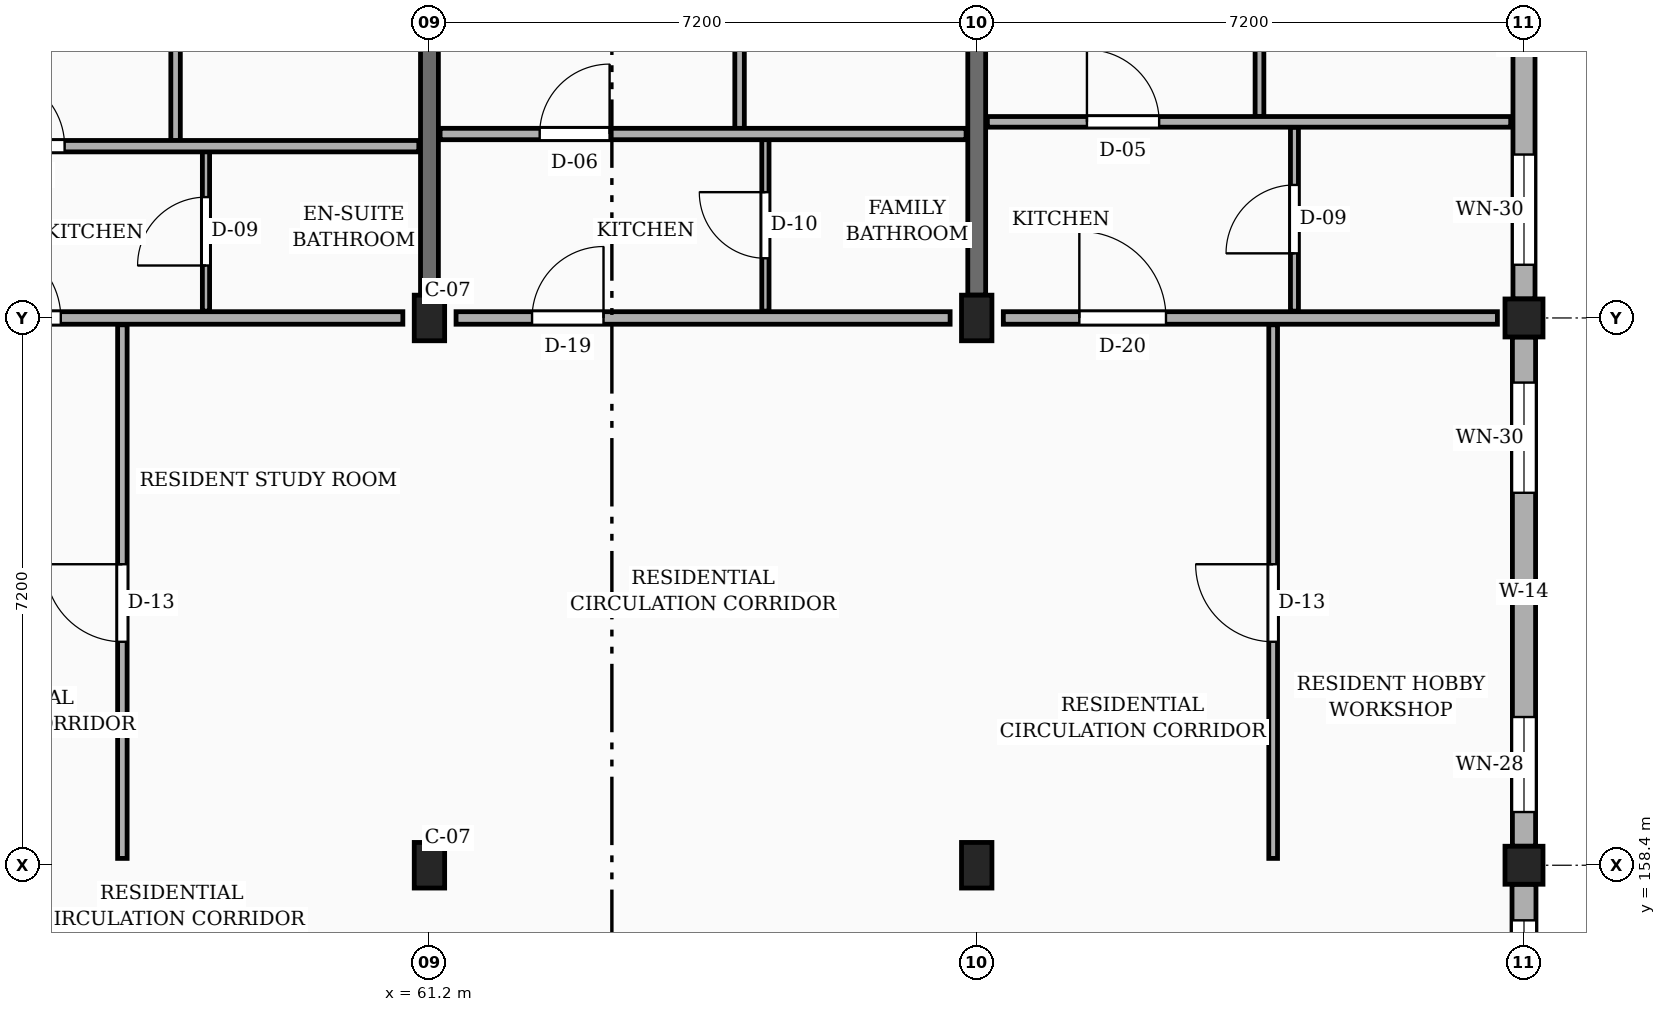
"""IFC4 building model, lengths in metres.
Left out: names, types, materials, properties, quantities, classifications, styles, units other than length and angle.
Written with IfcOpenShell. Run it as: python <this file> out.ifc"""

import sys

from ifc_helpers import new_model, si_unit, direction, frame, frame_2d, origin, origin_2d, place, context, subcontext, project, spatial, rectangle, extrude, element, fill, save


model = new_model("IFC4")
c1 = context("Model", 3, precision=1e-05, world=origin(), true_north=direction((0.0, 1.0)))
c2 = subcontext(c1, "Body", "Model", "MODEL_VIEW")
j1 = project(units=[si_unit("LENGTHUNIT", "METRE"), si_unit("PLANEANGLEUNIT", "RADIAN")], contexts=[c1])
p1 = place(None, origin())
s1 = spatial("IfcSite", under=j1, at=p1, CompositionType="ELEMENT")
p2 = place(p1, origin())
s2 = spatial("IfcBuilding", under=s1, at=p2, CompositionType="ELEMENT")
p3 = place(p2, frame((0.0, 0.0, 23.4)))
s3 = spatial("IfcBuildingStorey", under=s2, at=p3, CompositionType="ELEMENT", Elevation=23.4)
for number, where, z_axis, x_axis in (
    (1, (61.2, 158.4, 0.0), (0.0, 0.0, 1.0), (1.0, 0.0, 0.0)),
    (2, (61.2, 165.6, 0.0), (0.0, 0.0, 1.0), (1.0, 0.0, 0.0)),
    (3, (68.4, 158.4, 0.0), (0.0, 0.0, 1.0), (1.0, 0.0, 0.0)),
    (4, (68.4, 165.6, 0.0), (0.0, 0.0, 1.0), (1.0, 0.0, 0.0)),
):
    element("IfcColumn", number, at=place(p3, frame(where, z_axis=z_axis, x_axis=x_axis)), inside=s3, PredefinedType="COLUMN", context=c2, shape_type="SweptSolid", body=[
        extrude(rectangle(XDim=0.4, YDim=0.6, at=origin_2d()), origin(), (0.0, 0.0, 1.0), 3.15),
    ])
for number, where, z_axis, x_axis in (
    (5, (75.6, 158.4, 0.0), (0.0, 0.0, 1.0), (1.0, 0.0, 0.0)),
    (6, (75.6, 165.6, 0.0), (0.0, 0.0, 1.0), (1.0, 0.0, 0.0)),
):
    element("IfcColumn", number, at=place(p3, frame(where, z_axis=z_axis, x_axis=x_axis)), inside=s3, PredefinedType="COLUMN", context=c2, shape_type="SweptSolid", body=[
        extrude(rectangle(XDim=0.5, YDim=0.5, at=origin_2d()), origin(), (0.0, 0.0, 1.0), 3.15),
    ])
for number, where, z_axis, x_axis in (
    (7, (61.2, 165.9, 0.0), (0.0, 0.0, 1.0), (0.0, 1.0, 0.0)),
    (8, (68.4, 165.9, 0.0), (0.0, 0.0, 1.0), (0.0, 1.0, 0.0)),
):
    element("IfcWall", number, at=place(p3, frame(where, z_axis=z_axis, x_axis=x_axis)), inside=s3, PredefinedType="SOLIDWALL", context=c2, shape_type="SweptSolid", body=[
        extrude(rectangle(XDim=6.65, YDim=0.235, at=frame_2d((3.325, 0.0))), origin(), (0.0, 0.0, 1.0), 2.185),
    ])
p4 = place(p3, frame((75.6, 151.45, 0.0), z_axis=(0.0, 0.0, 1.0), x_axis=(0.0, 1.0, 0.0)))
e9 = element("IfcWall", 9, at=p4, inside=s3, PredefinedType="SOLIDWALL", context=c2, shape_type="SweptSolid", body=[
    extrude(rectangle(XDim=6.7, YDim=0.315, at=frame_2d((3.35, 0.0))), origin(), (0.0, 0.0, 1.0), 2.455),
])
p5 = place(p4, frame((2.12, 0.0, 0.78)))
e10 = element("IfcOpeningElement", 10, at=p5, cuts=e9, PredefinedType="OPENING", context=c2, shape_type="SweptSolid", body=[
    extrude(rectangle(XDim=1.05, YDim=1.44, at=frame_2d((0.525, 0.72))), frame((0.0, 0.167, 0.0), z_axis=(0.0, -1.0, 0.0), x_axis=(1.0, 0.0, 0.0)), (0.0, 0.0, 1.0), 0.335),
])
p6 = place(p4, frame((5.185, 0.0, 0.78)))
e11 = element("IfcOpeningElement", 11, at=p6, cuts=e9, PredefinedType="OPENING", context=c2, shape_type="SweptSolid", body=[
    extrude(rectangle(XDim=1.04, YDim=1.26, at=frame_2d((0.52, 0.63))), frame((0.0, 0.167, 0.0), z_axis=(0.0, -1.0, 0.0), x_axis=(1.0, 0.0, 0.0)), (0.0, 0.0, 1.0), 0.335),
])
p7 = place(p3, frame((75.6, 158.65, 0.0), z_axis=(0.0, 0.0, 1.0), x_axis=(0.0, 1.0, 0.0)))
e12 = element("IfcWall", 12, at=p7, inside=s3, PredefinedType="SOLIDWALL", context=c2, shape_type="SweptSolid", body=[
    extrude(rectangle(XDim=6.7, YDim=0.305, at=frame_2d((3.35, 0.0))), origin(), (0.0, 0.0, 1.0), 2.455),
])
p8 = place(p7, frame((0.45, 0.0, 0.78)))
e13 = element("IfcOpeningElement", 13, at=p8, cuts=e12, PredefinedType="OPENING", context=c2, shape_type="SweptSolid", body=[
    extrude(rectangle(XDim=1.25, YDim=1.44, at=frame_2d((0.625, 0.72))), frame((0.0, 0.163, 0.0), z_axis=(0.0, -1.0, 0.0), x_axis=(1.0, 0.0, 0.0)), (0.0, 0.0, 1.0), 0.325),
])
p9 = place(p7, frame((4.65, 0.0, 0.78)))
e14 = element("IfcOpeningElement", 14, at=p9, cuts=e12, PredefinedType="OPENING", context=c2, shape_type="SweptSolid", body=[
    extrude(rectangle(XDim=1.45, YDim=1.44, at=frame_2d((0.725, 0.72))), frame((0.0, 0.163, 0.0), z_axis=(0.0, -1.0, 0.0), x_axis=(1.0, 0.0, 0.0)), (0.0, 0.0, 1.0), 0.325),
])
p10 = place(p3, frame((75.6, 165.85, 0.0), z_axis=(0.0, 0.0, 1.0), x_axis=(0.0, 1.0, 0.0)))
e15 = element("IfcWall", 15, at=p10, inside=s3, PredefinedType="SOLIDWALL", context=c2, shape_type="SweptSolid", body=[
    extrude(rectangle(XDim=6.7, YDim=0.29, at=frame_2d((3.35, 0.0))), origin(), (0.0, 0.0, 1.0), 2.455),
])
p11 = place(p10, frame((0.45, 0.0, 0.78)))
e16 = element("IfcOpeningElement", 16, at=p11, cuts=e15, PredefinedType="OPENING", context=c2, shape_type="SweptSolid", body=[
    extrude(rectangle(XDim=1.45, YDim=1.44, at=frame_2d((0.725, 0.72))), frame((0.0, 0.155, 0.0), z_axis=(0.0, -1.0, 0.0), x_axis=(1.0, 0.0, 0.0)), (0.0, 0.0, 1.0), 0.31),
])
p12 = place(p10, frame((4.65, 0.0, 0.78)))
e17 = element("IfcOpeningElement", 17, at=p12, cuts=e15, PredefinedType="OPENING", context=c2, shape_type="SweptSolid", body=[
    extrude(rectangle(XDim=0.92, YDim=1.15, at=frame_2d((0.46, 0.575))), frame((0.0, 0.155, 0.0), z_axis=(0.0, -1.0, 0.0), x_axis=(1.0, 0.0, 0.0)), (0.0, 0.0, 1.0), 0.31),
])
p13 = place(p3, frame((54.35, 165.6, 0.0), z_axis=(0.0, 0.0, 1.0), x_axis=(1.0, 0.0, 0.0)))
e18 = element("IfcWall", 18, at=p13, inside=s3, PredefinedType="PARTITIONING", context=c2, shape_type="SweptSolid", body=[
    extrude(rectangle(XDim=6.5, YDim=0.165, at=frame_2d((3.25, 0.0))), origin(), (0.0, 0.0, 1.0), 2.32),
])
p14 = place(p13, frame((1.0, 0.0, 0.0)))
e19 = element("IfcOpeningElement", 19, at=p14, cuts=e18, PredefinedType="OPENING", context=c2, shape_type="SweptSolid", body=[
    extrude(rectangle(XDim=1.0, YDim=2.15, at=frame_2d((0.5, 1.075))), frame((0.0, 0.093, 0.0), z_axis=(0.0, -1.0, 0.0), x_axis=(1.0, 0.0, 0.0)), (0.0, 0.0, 1.0), 0.185),
])
p15 = place(p3, frame((61.55, 165.6, 0.0), z_axis=(0.0, 0.0, 1.0), x_axis=(1.0, 0.0, 0.0)))
e20 = element("IfcWall", 20, at=p15, inside=s3, PredefinedType="PARTITIONING", context=c2, shape_type="SweptSolid", body=[
    extrude(rectangle(XDim=6.5, YDim=0.165, at=frame_2d((3.25, 0.0))), origin(), (0.0, 0.0, 1.0), 2.32),
])
p16 = place(p15, frame((1.0, 0.0, 0.0)))
e21 = element("IfcOpeningElement", 21, at=p16, cuts=e20, PredefinedType="OPENING", context=c2, shape_type="SweptSolid", body=[
    extrude(rectangle(XDim=0.94, YDim=2.12, at=frame_2d((0.47, 1.06))), frame((0.0, 0.093, 0.0), z_axis=(0.0, -1.0, 0.0), x_axis=(1.0, 0.0, 0.0)), (0.0, 0.0, 1.0), 0.185),
])
p17 = place(p3, frame((68.75, 165.6, 0.0), z_axis=(0.0, 0.0, 1.0), x_axis=(1.0, 0.0, 0.0)))
e22 = element("IfcWall", 22, at=p17, inside=s3, PredefinedType="PARTITIONING", context=c2, shape_type="SweptSolid", body=[
    extrude(rectangle(XDim=6.5, YDim=0.165, at=frame_2d((3.25, 0.0))), origin(), (0.0, 0.0, 1.0), 2.32),
])
p18 = place(p17, frame((1.0, 0.0, 0.0)))
e23 = element("IfcOpeningElement", 23, at=p18, cuts=e22, PredefinedType="OPENING", context=c2, shape_type="SweptSolid", body=[
    extrude(rectangle(XDim=1.14, YDim=2.18, at=frame_2d((0.57, 1.09))), frame((0.0, 0.093, 0.0), z_axis=(0.0, -1.0, 0.0), x_axis=(1.0, 0.0, 0.0)), (0.0, 0.0, 1.0), 0.185),
])
p19 = place(p3, frame((57.16, 158.49, 0.0), z_axis=(0.0, 0.0, 1.0), x_axis=(0.0, 1.0, 0.0)))
e24 = element("IfcWall", 24, at=p19, inside=s3, PredefinedType="PARTITIONING", context=c2, shape_type="SweptSolid", body=[
    extrude(rectangle(XDim=7.02, YDim=0.125, at=frame_2d((3.51, 0.0))), origin(), (0.0, 0.0, 1.0), 2.32),
])
p20 = place(p19, frame((2.85, 0.0, 0.0)))
e25 = element("IfcOpeningElement", 25, at=p20, cuts=e24, PredefinedType="OPENING", context=c2, shape_type="SweptSolid", body=[
    extrude(rectangle(XDim=1.02, YDim=2.15, at=frame_2d((0.51, 1.075))), frame((0.0, 0.073, 0.0), z_axis=(0.0, -1.0, 0.0), x_axis=(1.0, 0.0, 0.0)), (0.0, 0.0, 1.0), 0.145),
])
p21 = place(p3, frame((57.86, 167.93, 0.0), z_axis=(0.0, 0.0, 1.0), x_axis=(0.0, 1.0, 0.0)))
e26 = element("IfcWall", 26, at=p21, inside=s3, PredefinedType="PARTITIONING", context=c2, shape_type="SweptSolid", body=[
    extrude(rectangle(XDim=4.695, YDim=0.125, at=frame_2d((2.348, 0.0))), origin(), (0.0, 0.0, 1.0), 2.32),
])
p22 = place(p21, frame((1.897, 0.0, 0.0)))
e27 = element("IfcOpeningElement", 27, at=p22, cuts=e26, PredefinedType="OPENING", context=c2, shape_type="SweptSolid", body=[
    extrude(rectangle(XDim=0.9, YDim=2.1, at=frame_2d((0.45, 1.05))), frame((0.0, 0.073, 0.0), z_axis=(0.0, -1.0, 0.0), x_axis=(1.0, 0.0, 0.0)), (0.0, 0.0, 1.0), 0.145),
])
p23 = place(p3, frame((58.26, 165.69, 0.0), z_axis=(0.0, 0.0, 1.0), x_axis=(0.0, 1.0, 0.0)))
e28 = element("IfcWall", 28, at=p23, inside=s3, PredefinedType="PARTITIONING", context=c2, shape_type="SweptSolid", body=[
    extrude(rectangle(XDim=2.1, YDim=0.095, at=frame_2d((1.05, 0.0))), origin(), (0.0, 0.0, 1.0), 2.32),
])
p24 = place(p23, frame((0.6, 0.0, 0.0)))
e29 = element("IfcOpeningElement", 29, at=p24, cuts=e28, PredefinedType="OPENING", context=c2, shape_type="SweptSolid", body=[
    extrude(rectangle(XDim=0.9, YDim=2.05, at=frame_2d((0.45, 1.025))), frame((0.0, 0.058, 0.0), z_axis=(0.0, -1.0, 0.0), x_axis=(1.0, 0.0, 0.0)), (0.0, 0.0, 1.0), 0.115),
])
p25 = place(p3, frame((54.14, 167.86, 0.0), z_axis=(0.0, 0.0, 1.0), x_axis=(1.0, 0.0, 0.0)))
e30 = element("IfcWall", 30, at=p25, inside=s3, PredefinedType="PARTITIONING", context=c2, shape_type="SweptSolid", body=[
    extrude(rectangle(XDim=6.92, YDim=0.15, at=frame_2d((3.46, 0.0))), origin(), (0.0, 0.0, 1.0), 2.32),
])
p26 = place(p25, frame((1.31, 0.0, 0.0)))
e31 = element("IfcOpeningElement", 31, at=p26, cuts=e30, PredefinedType="OPENING", context=c2, shape_type="SweptSolid", body=[
    extrude(rectangle(XDim=0.95, YDim=2.1, at=frame_2d((0.475, 1.05))), frame((0.0, 0.085, 0.0), z_axis=(0.0, -1.0, 0.0), x_axis=(1.0, 0.0, 0.0)), (0.0, 0.0, 1.0), 0.17),
])
p27 = place(p3, frame((65.28, 168.09, 0.0), z_axis=(0.0, 0.0, 1.0), x_axis=(0.0, 1.0, 0.0)))
e32 = element("IfcWall", 32, at=p27, inside=s3, PredefinedType="PARTITIONING", context=c2, shape_type="SweptSolid", body=[
    extrude(rectangle(XDim=4.535, YDim=0.125, at=frame_2d((2.268, 0.0))), origin(), (0.0, 0.0, 1.0), 2.32),
])
p28 = place(p27, frame((1.827, 0.0, 0.0)))
e33 = element("IfcOpeningElement", 33, at=p28, cuts=e32, PredefinedType="OPENING", context=c2, shape_type="SweptSolid", body=[
    extrude(rectangle(XDim=0.88, YDim=2.08, at=frame_2d((0.44, 1.04))), frame((0.0, 0.073, 0.0), z_axis=(0.0, -1.0, 0.0), x_axis=(1.0, 0.0, 0.0)), (0.0, 0.0, 1.0), 0.145),
])
p29 = place(p3, frame((65.62, 165.69, 0.0), z_axis=(0.0, 0.0, 1.0), x_axis=(0.0, 1.0, 0.0)))
e34 = element("IfcWall", 34, at=p29, inside=s3, PredefinedType="PARTITIONING", context=c2, shape_type="SweptSolid", body=[
    extrude(rectangle(XDim=2.26, YDim=0.095, at=frame_2d((1.13, 0.0))), origin(), (0.0, 0.0, 1.0), 2.32),
])
p30 = place(p29, frame((0.695, 0.0, 0.0)))
e35 = element("IfcOpeningElement", 35, at=p30, cuts=e34, PredefinedType="OPENING", context=c2, shape_type="SweptSolid", body=[
    extrude(rectangle(XDim=0.87, YDim=2.05, at=frame_2d((0.435, 1.025))), frame((0.0, 0.058, 0.0), z_axis=(0.0, -1.0, 0.0), x_axis=(1.0, 0.0, 0.0)), (0.0, 0.0, 1.0), 0.115),
])
p31 = place(p3, frame((61.34, 168.02, 0.0), z_axis=(0.0, 0.0, 1.0), x_axis=(1.0, 0.0, 0.0)))
e36 = element("IfcWall", 36, at=p31, inside=s3, PredefinedType="PARTITIONING", context=c2, shape_type="SweptSolid", body=[
    extrude(rectangle(XDim=6.92, YDim=0.15, at=frame_2d((3.46, 0.0))), origin(), (0.0, 0.0, 1.0), 2.32),
])
p32 = place(p31, frame((1.31, 0.0, 0.0)))
e37 = element("IfcOpeningElement", 37, at=p32, cuts=e36, PredefinedType="OPENING", context=c2, shape_type="SweptSolid", body=[
    extrude(rectangle(XDim=0.92, YDim=2.1, at=frame_2d((0.46, 1.05))), frame((0.0, 0.085, 0.0), z_axis=(0.0, -1.0, 0.0), x_axis=(1.0, 0.0, 0.0)), (0.0, 0.0, 1.0), 0.17),
])
p33 = place(p3, frame((72.3, 158.49, 0.0), z_axis=(0.0, 0.0, 1.0), x_axis=(0.0, 1.0, 0.0)))
e38 = element("IfcWall", 38, at=p33, inside=s3, PredefinedType="PARTITIONING", context=c2, shape_type="SweptSolid", body=[
    extrude(rectangle(XDim=7.02, YDim=0.115, at=frame_2d((3.51, 0.0))), origin(), (0.0, 0.0, 1.0), 2.32),
])
p34 = place(p33, frame((2.85, 0.0, 0.0)))
e39 = element("IfcOpeningElement", 39, at=p34, cuts=e38, PredefinedType="OPENING", context=c2, shape_type="SweptSolid", body=[
    extrude(rectangle(XDim=1.02, YDim=2.15, at=frame_2d((0.51, 1.075))), frame((0.0, 0.067, 0.0), z_axis=(0.0, -1.0, 0.0), x_axis=(1.0, 0.0, 0.0)), (0.0, 0.0, 1.0), 0.135),
])
p35 = place(p3, frame((72.12, 168.25, 0.0), z_axis=(0.0, 0.0, 1.0), x_axis=(0.0, 1.0, 0.0)))
e40 = element("IfcWall", 40, at=p35, inside=s3, PredefinedType="PARTITIONING", context=c2, shape_type="SweptSolid", body=[
    extrude(rectangle(XDim=4.375, YDim=0.115, at=frame_2d((2.188, 0.0))), origin(), (0.0, 0.0, 1.0), 2.32),
])
p36 = place(p35, frame((1.738, 0.0, 0.0)))
e41 = element("IfcOpeningElement", 41, at=p36, cuts=e40, PredefinedType="OPENING", context=c2, shape_type="SweptSolid", body=[
    extrude(rectangle(XDim=0.9, YDim=2.1, at=frame_2d((0.45, 1.05))), frame((0.0, 0.067, 0.0), z_axis=(0.0, -1.0, 0.0), x_axis=(1.0, 0.0, 0.0)), (0.0, 0.0, 1.0), 0.135),
])
p37 = place(p3, frame((72.58, 165.69, 0.0), z_axis=(0.0, 0.0, 1.0), x_axis=(0.0, 1.0, 0.0)))
e42 = element("IfcWall", 42, at=p37, inside=s3, PredefinedType="PARTITIONING", context=c2, shape_type="SweptSolid", body=[
    extrude(rectangle(XDim=2.42, YDim=0.105, at=frame_2d((1.21, 0.0))), origin(), (0.0, 0.0, 1.0), 2.32),
])
p38 = place(p37, frame((0.76, 0.0, 0.0)))
e43 = element("IfcOpeningElement", 43, at=p38, cuts=e42, PredefinedType="OPENING", context=c2, shape_type="SweptSolid", body=[
    extrude(rectangle(XDim=0.9, YDim=2.05, at=frame_2d((0.45, 1.025))), frame((0.0, 0.062, 0.0), z_axis=(0.0, -1.0, 0.0), x_axis=(1.0, 0.0, 0.0)), (0.0, 0.0, 1.0), 0.125),
])
p39 = place(p3, frame((68.54, 168.18, 0.0), z_axis=(0.0, 0.0, 1.0), x_axis=(1.0, 0.0, 0.0)))
e44 = element("IfcWall", 44, at=p39, inside=s3, PredefinedType="PARTITIONING", context=c2, shape_type="SweptSolid", body=[
    extrude(rectangle(XDim=6.885, YDim=0.14, at=frame_2d((3.442, 0.0))), origin(), (0.0, 0.0, 1.0), 2.32),
])
p40 = place(p39, frame((1.31, 0.0, 0.0)))
e45 = element("IfcOpeningElement", 45, at=p40, cuts=e44, PredefinedType="OPENING", context=c2, shape_type="SweptSolid", body=[
    extrude(rectangle(XDim=0.95, YDim=2.1, at=frame_2d((0.475, 1.05))), frame((0.0, 0.08, 0.0), z_axis=(0.0, -1.0, 0.0), x_axis=(1.0, 0.0, 0.0)), (0.0, 0.0, 1.0), 0.16),
])
p41 = place(p6, origin())
e46 = element("IfcWindow", 46, at=p41, inside=s3, PartitioningType="SINGLE_PANEL", PredefinedType="WINDOW", context=c2, shape_type="SweptSolid", body=[
    extrude(rectangle(XDim=1.04, YDim=1.26, at=frame_2d((0.52, 0.63))), frame((0.0, 0.03, 0.0), z_axis=(0.0, -1.0, 0.0), x_axis=(1.0, 0.0, 0.0)), (0.0, 0.0, 1.0), 0.06),
])
fill(e11, e46)
p42 = place(p8, origin())
e47 = element("IfcWindow", 47, at=p42, inside=s3, PartitioningType="SINGLE_PANEL", PredefinedType="WINDOW", context=c2, shape_type="SweptSolid", body=[
    extrude(rectangle(XDim=1.25, YDim=1.44, at=frame_2d((0.625, 0.72))), frame((0.0, 0.03, 0.0), z_axis=(0.0, -1.0, 0.0), x_axis=(1.0, 0.0, 0.0)), (0.0, 0.0, 1.0), 0.06),
])
fill(e13, e47)
p43 = place(p9, origin())
e48 = element("IfcWindow", 48, at=p43, inside=s3, PartitioningType="SINGLE_PANEL", PredefinedType="WINDOW", context=c2, shape_type="SweptSolid", body=[
    extrude(rectangle(XDim=1.45, YDim=1.44, at=frame_2d((0.725, 0.72))), frame((0.0, 0.03, 0.0), z_axis=(0.0, -1.0, 0.0), x_axis=(1.0, 0.0, 0.0)), (0.0, 0.0, 1.0), 0.06),
])
fill(e14, e48)
p44 = place(p11, origin())
e49 = element("IfcWindow", 49, at=p44, inside=s3, PartitioningType="SINGLE_PANEL", PredefinedType="WINDOW", context=c2, shape_type="SweptSolid", body=[
    extrude(rectangle(XDim=1.45, YDim=1.44, at=frame_2d((0.725, 0.72))), frame((0.0, 0.03, 0.0), z_axis=(0.0, -1.0, 0.0), x_axis=(1.0, 0.0, 0.0)), (0.0, 0.0, 1.0), 0.06),
])
fill(e16, e49)
p45 = place(p14, origin())
e50 = element("IfcDoor", 50, at=p45, inside=s3, OperationType="SINGLE_SWING_LEFT", PredefinedType="DOOR", context=c2, shape_type="SweptSolid", body=[
    extrude(rectangle(XDim=1.0, YDim=2.15, at=frame_2d((0.5, 1.075))), frame((0.0, 0.025, 0.0), z_axis=(0.0, -1.0, 0.0), x_axis=(1.0, 0.0, 0.0)), (0.0, 0.0, 1.0), 0.05),
])
fill(e19, e50)
p46 = place(p16, origin())
e51 = element("IfcDoor", 51, at=p46, inside=s3, OperationType="SINGLE_SWING_RIGHT", PredefinedType="DOOR", context=c2, shape_type="SweptSolid", body=[
    extrude(rectangle(XDim=0.94, YDim=2.12, at=frame_2d((0.47, 1.06))), frame((0.0, 0.025, 0.0), z_axis=(0.0, -1.0, 0.0), x_axis=(1.0, 0.0, 0.0)), (0.0, 0.0, 1.0), 0.05),
])
fill(e21, e51)
p47 = place(p18, origin())
e52 = element("IfcDoor", 52, at=p47, inside=s3, OperationType="SINGLE_SWING_LEFT", PredefinedType="DOOR", context=c2, shape_type="SweptSolid", body=[
    extrude(rectangle(XDim=1.14, YDim=2.18, at=frame_2d((0.57, 1.09))), frame((0.0, 0.025, 0.0), z_axis=(0.0, -1.0, 0.0), x_axis=(1.0, 0.0, 0.0)), (0.0, 0.0, 1.0), 0.05),
])
fill(e23, e52)
p48 = place(p20, origin())
e53 = element("IfcDoor", 53, at=p48, inside=s3, OperationType="SINGLE_SWING_RIGHT", PredefinedType="DOOR", context=c2, shape_type="SweptSolid", body=[
    extrude(rectangle(XDim=1.02, YDim=2.15, at=frame_2d((0.51, 1.075))), frame((0.0, 0.025, 0.0), z_axis=(0.0, -1.0, 0.0), x_axis=(1.0, 0.0, 0.0)), (0.0, 0.0, 1.0), 0.05),
])
fill(e25, e53)
p49 = place(p24, origin())
e54 = element("IfcDoor", 54, at=p49, inside=s3, OperationType="SINGLE_SWING_LEFT", PredefinedType="DOOR", context=c2, shape_type="SweptSolid", body=[
    extrude(rectangle(XDim=0.9, YDim=2.05, at=frame_2d((0.45, 1.025))), frame((0.0, 0.025, 0.0), z_axis=(0.0, -1.0, 0.0), x_axis=(1.0, 0.0, 0.0)), (0.0, 0.0, 1.0), 0.05),
])
fill(e29, e54)
p50 = place(p26, origin())
e55 = element("IfcDoor", 55, at=p50, inside=s3, OperationType="SINGLE_SWING_LEFT", PredefinedType="DOOR", context=c2, shape_type="SweptSolid", body=[
    extrude(rectangle(XDim=0.95, YDim=2.1, at=frame_2d((0.475, 1.05))), frame((0.0, 0.025, 0.0), z_axis=(0.0, -1.0, 0.0), x_axis=(1.0, 0.0, 0.0)), (0.0, 0.0, 1.0), 0.05),
])
fill(e31, e55)
p51 = place(p30, origin())
e56 = element("IfcDoor", 56, at=p51, inside=s3, OperationType="SINGLE_SWING_RIGHT", PredefinedType="DOOR", context=c2, shape_type="SweptSolid", body=[
    extrude(rectangle(XDim=0.87, YDim=2.05, at=frame_2d((0.435, 1.025))), frame((0.0, 0.025, 0.0), z_axis=(0.0, -1.0, 0.0), x_axis=(1.0, 0.0, 0.0)), (0.0, 0.0, 1.0), 0.05),
])
fill(e35, e56)
p52 = place(p32, origin())
e57 = element("IfcDoor", 57, at=p52, inside=s3, OperationType="SINGLE_SWING_RIGHT", PredefinedType="DOOR", context=c2, shape_type="SweptSolid", body=[
    extrude(rectangle(XDim=0.92, YDim=2.1, at=frame_2d((0.46, 1.05))), frame((0.0, 0.025, 0.0), z_axis=(0.0, -1.0, 0.0), x_axis=(1.0, 0.0, 0.0)), (0.0, 0.0, 1.0), 0.05),
])
fill(e37, e57)
p53 = place(p34, origin())
e58 = element("IfcDoor", 58, at=p53, inside=s3, OperationType="SINGLE_SWING_RIGHT", PredefinedType="DOOR", context=c2, shape_type="SweptSolid", body=[
    extrude(rectangle(XDim=1.02, YDim=2.15, at=frame_2d((0.51, 1.075))), frame((0.0, 0.025, 0.0), z_axis=(0.0, -1.0, 0.0), x_axis=(1.0, 0.0, 0.0)), (0.0, 0.0, 1.0), 0.05),
])
fill(e39, e58)
p54 = place(p38, origin())
e59 = element("IfcDoor", 59, at=p54, inside=s3, OperationType="SINGLE_SWING_LEFT", PredefinedType="DOOR", context=c2, shape_type="SweptSolid", body=[
    extrude(rectangle(XDim=0.9, YDim=2.05, at=frame_2d((0.45, 1.025))), frame((0.0, 0.025, 0.0), z_axis=(0.0, -1.0, 0.0), x_axis=(1.0, 0.0, 0.0)), (0.0, 0.0, 1.0), 0.05),
])
fill(e43, e59)
p55 = place(p40, origin())
e60 = element("IfcDoor", 60, at=p55, inside=s3, OperationType="SINGLE_SWING_LEFT", PredefinedType="DOOR", context=c2, shape_type="SweptSolid", body=[
    extrude(rectangle(XDim=0.95, YDim=2.1, at=frame_2d((0.475, 1.05))), frame((0.0, 0.025, 0.0), z_axis=(0.0, -1.0, 0.0), x_axis=(1.0, 0.0, 0.0)), (0.0, 0.0, 1.0), 0.05),
])
fill(e45, e60)
save(model, sys.argv[1])
